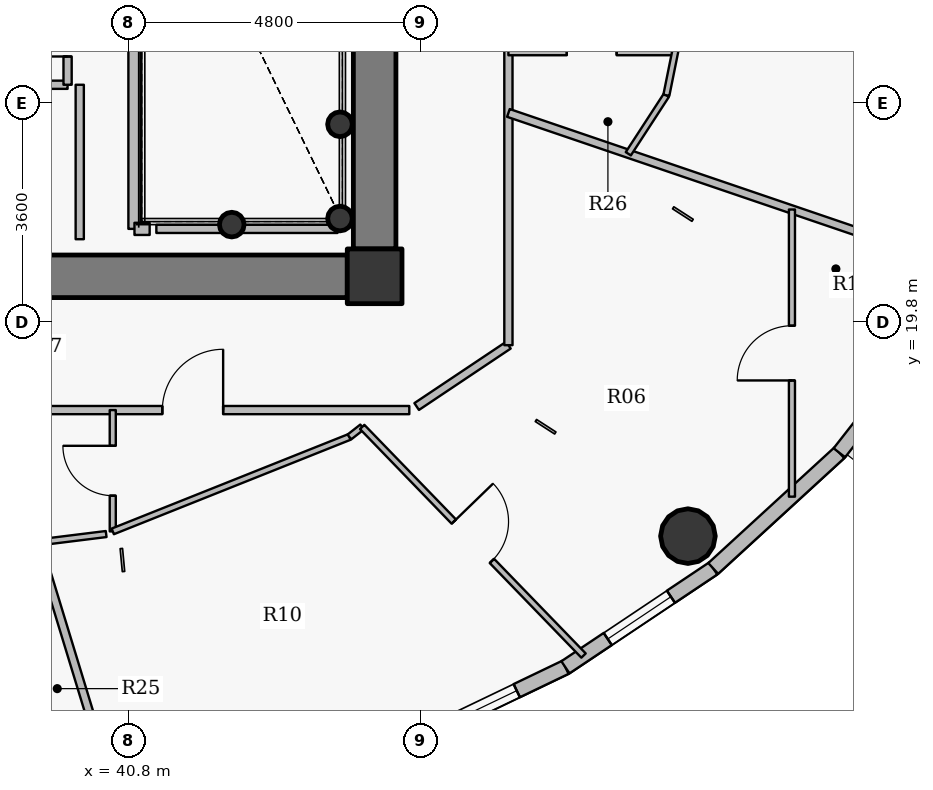
"""IFC4 building model, lengths in metres.
Left out: names, types, materials, properties, quantities, classifications, styles, units other than length and angle.
Written with IfcOpenShell. Run it as: python <this file> out.ifc"""

import sys

from ifc_helpers import new_model, si_unit, direction, frame, frame_2d, origin, origin_2d, place, context, subcontext, project, spatial, rectangle, hollow_circle, extrude, source, transform, mapped, element, fill, save


model = new_model("IFC4")
c1 = context("Model", 3, precision=1e-05, world=origin(), true_north=direction((0.0, 1.0)))
c2 = subcontext(c1, "Body", "Model", "MODEL_VIEW")
j1 = project(units=[si_unit("LENGTHUNIT", "METRE"), si_unit("PLANEANGLEUNIT", "RADIAN")], contexts=[c1])
p1 = place(None, origin())
s1 = spatial("IfcSite", under=j1, at=p1, CompositionType="ELEMENT")
p2 = place(p1, origin())
s2 = spatial("IfcBuilding", under=s1, at=p2, CompositionType="ELEMENT")
p3 = place(p2, frame((0.0, 0.0, 327.8)))
s3 = spatial("IfcBuildingStorey", under=s2, at=p3, CompositionType="ELEMENT", Elevation=327.8)
p4 = place(p3, frame((44.85, 20.55, 0.0), z_axis=(0.0, 0.0, 1.0), x_axis=(1.0, 0.0, 0.0)))
e1 = element("IfcColumn", 1, at=p4, inside=s3, PredefinedType="COLUMN", context=c2, shape_type="SweptSolid", body=[
    extrude(rectangle(XDim=0.9, YDim=0.9, at=origin_2d()), origin(), (0.0, 0.0, 1.0), 3.8),
])
for number, where, z_axis, x_axis in (
    (2, (44.28, 21.5, 0.0), (0.0, 0.0, 1.0), (1.0, 0.0, 0.0)),
    (3, (44.28, 23.05, 0.0), (0.0, 0.0, 1.0), (1.0, 0.0, 0.0)),
    (4, (42.5, 21.4, 0.0), (0.0, 0.0, 1.0), (1.0, 0.0, 0.0)),
):
    element("IfcColumn", number, at=place(p3, frame(where, z_axis=z_axis, x_axis=x_axis)), inside=s3, PredefinedType="COLUMN", context=c2, shape_type="SweptSolid", body=[
        extrude(hollow_circle(Radius=0.203, WallThickness=0.016, at=origin_2d()), origin(), (0.0, 0.0, 1.0), 3.8),
    ])
p5 = place(p3, frame((44.85, 33.0, 0.0), z_axis=(0.0, 0.0, 1.0), x_axis=(0.0, -1.0, 0.0)))
e5 = element("IfcWall", 5, at=p5, inside=s3, PredefinedType="SHEAR", context=c2, shape_type="SweptSolid", body=[
    extrude(rectangle(XDim=12.0, YDim=0.7, at=frame_2d((6.0, 0.0))), origin(), (0.0, 0.0, 1.0), 3.1),
])
p6 = place(p3, frame((44.4, 20.55, 0.0), z_axis=(0.0, 0.0, 1.0), x_axis=(-1.0, 0.0, 0.0)))
e6 = element("IfcWall", 6, at=p6, inside=s3, PredefinedType="SHEAR", context=c2, shape_type="SweptSolid", body=[
    extrude(rectangle(XDim=16.8, YDim=0.7, at=frame_2d((8.4, 0.0))), origin(), (0.0, 0.0, 1.0), 3.1),
])
p7 = place(p6, frame((13.0, 0.0, 0.0)))
e7 = element("IfcOpeningElement", 7, at=p7, cuts=e6, PredefinedType="OPENING", context=c2, shape_type="SweptSolid", body=[
    extrude(rectangle(XDim=1.15, YDim=2.15, at=origin_2d()), frame((0.575, 0.36, 1.075), z_axis=(0.0, -1.0, 0.0), x_axis=(1.0, 0.0, 0.0)), (0.0, 0.0, 1.0), 0.72),
])
p8 = place(p6, frame((9.15, 0.0, 0.0)))
e8 = element("IfcOpeningElement", 8, at=p8, cuts=e6, PredefinedType="OPENING", context=c2, shape_type="SweptSolid", body=[
    extrude(rectangle(XDim=1.15, YDim=2.15, at=origin_2d()), frame((0.575, 0.36, 1.075), z_axis=(0.0, -1.0, 0.0), x_axis=(1.0, 0.0, 0.0)), (0.0, 0.0, 1.0), 0.72),
])
p9 = place(p3, frame((50.002, 16.277, 0.0), z_axis=(0.0, 0.0, 1.0), x_axis=(1.0, 0.0, 0.0)))
e9 = element("IfcColumn", 9, at=p9, inside=s3, PredefinedType="COLUMN", context=c2, shape_type="SweptSolid", body=[
    extrude(hollow_circle(Radius=0.45, WallThickness=0.028, at=origin_2d()), origin(), (0.0, 0.0, 1.0), 3.8),
])
p10 = place(p3, frame((47.988, 14.12, 0.0), z_axis=(0.0, 0.0, 1.0), x_axis=(-0.901557057889, -0.432660226241, 0.0)))
e10 = element("IfcWall", 10, at=p10, inside=s3, PredefinedType="SOLIDWALL", context=c2, shape_type="SweptSolid", body=[
    extrude(rectangle(XDim=3.025, YDim=0.24, at=frame_2d((1.513, 0.0))), origin(), (0.0, 0.0, 1.0), 3.55),
])
p11 = place(p10, frame((0.888, 0.0, 0.9)))
e11 = element("IfcOpeningElement", 11, at=p11, cuts=e10, PredefinedType="OPENING", context=c2, shape_type="SweptSolid", body=[
    extrude(rectangle(XDim=1.25, YDim=1.65, at=origin_2d()), frame((0.625, 0.13, 0.825), z_axis=(0.0, -1.0, 0.0), x_axis=(1.0, 0.0, 0.0)), (0.0, 0.0, 1.0), 0.26),
])
p12 = place(p3, frame((50.419, 15.746, 0.0), z_axis=(0.0, 0.0, 1.0), x_axis=(-0.831201688654, -0.555970999944, 0.0)))
e12 = element("IfcWall", 12, at=p12, inside=s3, PredefinedType="SOLIDWALL", context=c2, shape_type="SweptSolid", body=[
    extrude(rectangle(XDim=2.925, YDim=0.24, at=frame_2d((1.462, 0.0))), origin(), (0.0, 0.0, 1.0), 3.55),
])
p13 = place(p12, frame((0.837, 0.0, 0.9)))
e13 = element("IfcOpeningElement", 13, at=p13, cuts=e12, PredefinedType="OPENING", context=c2, shape_type="SweptSolid", body=[
    extrude(rectangle(XDim=1.25, YDim=1.65, at=origin_2d()), frame((0.625, 0.13, 0.825), z_axis=(0.0, -1.0, 0.0), x_axis=(1.0, 0.0, 0.0)), (0.0, 0.0, 1.0), 0.26),
])
p14 = place(p3, frame((52.493, 17.648, 0.0), z_axis=(0.0, 0.0, 1.0), x_axis=(-0.737020907932, -0.675869944051, 0.0)))
e14 = element("IfcWall", 14, at=p14, inside=s3, PredefinedType="SOLIDWALL", context=c2, shape_type="SweptSolid", body=[
    extrude(rectangle(XDim=2.815, YDim=0.24, at=frame_2d((1.407, 0.0))), origin(), (0.0, 0.0, 1.0), 3.55),
])
p15 = place(p3, frame((54.161, 19.779, 0.0), z_axis=(0.0, 0.0, 1.0), x_axis=(-0.616286367698, -0.78752213492, 0.0)))
e15 = element("IfcWall", 15, at=p15, inside=s3, PredefinedType="SOLIDWALL", context=c2, shape_type="SweptSolid", body=[
    extrude(rectangle(XDim=2.706, YDim=0.24, at=frame_2d((1.353, 0.0))), origin(), (0.0, 0.0, 1.0), 3.55),
])
p16 = place(p3, frame((26.58, 18.35, 0.0), z_axis=(0.0, 0.0, 1.0), x_axis=(1.0, 0.0, 0.0)))
e16 = element("IfcWall", 16, at=p16, inside=s3, PredefinedType="PARTITIONING", context=c2, shape_type="SweptSolid", body=[
    extrude(rectangle(XDim=18.84, YDim=0.135, at=frame_2d((9.42, 0.0))), origin(), (0.0, 0.0, 1.0), 3.085),
])
p17 = place(p16, frame((0.94, 0.0, 0.0)))
e17 = element("IfcOpeningElement", 17, at=p17, cuts=e16, PredefinedType="OPENING", context=c2, shape_type="SweptSolid", body=[
    extrude(rectangle(XDim=1.0, YDim=2.15, at=origin_2d()), frame((0.5, 0.078, 1.075), z_axis=(0.0, -1.0, 0.0), x_axis=(1.0, 0.0, 0.0)), (0.0, 0.0, 1.0), 0.155),
])
p18 = place(p16, frame((6.621, 0.0, 0.0)))
e18 = element("IfcOpeningElement", 18, at=p18, cuts=e16, PredefinedType="OPENING", context=c2, shape_type="SweptSolid", body=[
    extrude(rectangle(XDim=1.0, YDim=2.15, at=origin_2d()), frame((0.5, 0.078, 1.075), z_axis=(0.0, -1.0, 0.0), x_axis=(1.0, 0.0, 0.0)), (0.0, 0.0, 1.0), 0.155),
])
p19 = place(p16, frame((14.778, 0.0, 0.0)))
e19 = element("IfcOpeningElement", 19, at=p19, cuts=e16, PredefinedType="OPENING", context=c2, shape_type="SweptSolid", body=[
    extrude(rectangle(XDim=1.0, YDim=2.15, at=origin_2d()), frame((0.5, 0.078, 1.075), z_axis=(0.0, -1.0, 0.0), x_axis=(1.0, 0.0, 0.0)), (0.0, 0.0, 1.0), 0.155),
])
p20 = place(p3, frame((35.45, 23.7, 0.0), z_axis=(0.0, 0.0, 1.0), x_axis=(1.0, 0.0, 0.0)))
e20 = element("IfcWall", 20, at=p20, inside=s3, PredefinedType="PARTITIONING", context=c2, shape_type="SweptSolid", body=[
    extrude(rectangle(XDim=4.35, YDim=0.135, at=frame_2d((2.175, 0.0))), origin(), (0.0, 0.0, 1.0), 3.135),
])
p21 = place(p20, frame((1.625, 0.0, 0.0)))
e21 = element("IfcOpeningElement", 21, at=p21, cuts=e20, PredefinedType="OPENING", context=c2, shape_type="SweptSolid", body=[
    extrude(rectangle(XDim=1.1, YDim=2.15, at=origin_2d()), frame((0.55, 0.078, 1.075), z_axis=(0.0, -1.0, 0.0), x_axis=(1.0, 0.0, 0.0)), (0.0, 0.0, 1.0), 0.155),
])
p22 = place(p3, frame((39.304, 16.171, 0.0), z_axis=(0.0, 0.0, 1.0), x_axis=(0.992405921313, 0.123006045959, 0.0)))
e22 = element("IfcWall", 22, at=p22, inside=s3, PredefinedType="PARTITIONING", context=c2, shape_type="SweptSolid", body=[
    extrude(rectangle(XDim=1.139, YDim=0.1, at=frame_2d((0.57, 0.0))), origin(), (0.0, 0.0, 1.0), 3.085),
])
p23 = place(p3, frame((39.304, 16.171, 0.0), z_axis=(0.0, 0.0, 1.0), x_axis=(0.291820739467, -0.956473029425, 0.0)))
e23 = element("IfcWall", 23, at=p23, inside=s3, PredefinedType="PARTITIONING", context=c2, shape_type="SweptSolid", body=[
    extrude(rectangle(XDim=4.834, YDim=0.135, at=frame_2d((2.417, 0.0))), origin(), (0.0, 0.0, 1.0), 3.035),
])
p24 = place(p3, frame((39.8, 23.7, 0.0), z_axis=(0.0, 0.0, 1.0), x_axis=(0.0, 1.0, 0.0)))
e24 = element("IfcWall", 24, at=p24, inside=s3, PredefinedType="PARTITIONING", context=c2, shape_type="SweptSolid", body=[
    extrude(rectangle(XDim=1.75, YDim=0.135, at=frame_2d((0.875, 0.0))), origin(), (0.0, 0.0, 1.0), 3.55),
])
p25 = place(p24, frame((0.465, 0.0, 0.0)))
e25 = element("IfcOpeningElement", 25, at=p25, cuts=e24, PredefinedType="OPENING", context=c2, shape_type="SweptSolid", body=[
    extrude(rectangle(XDim=0.82, YDim=2.1, at=origin_2d()), frame((0.41, 0.078, 1.05), z_axis=(0.0, -1.0, 0.0), x_axis=(1.0, 0.0, 0.0)), (0.0, 0.0, 1.0), 0.155),
])
p26 = place(p3, frame((40.543, 16.355, 0.0), z_axis=(0.0, 0.0, 1.0), x_axis=(0.0, 1.0, 0.0)))
e26 = element("IfcWall", 26, at=p26, inside=s3, PredefinedType="PARTITIONING", context=c2, shape_type="SweptSolid", body=[
    extrude(rectangle(XDim=1.995, YDim=0.1, at=frame_2d((0.998, 0.0))), origin(), (0.0, 0.0, 1.0), 3.085),
])
p27 = place(p26, frame((0.588, 0.0, 0.0)))
e27 = element("IfcOpeningElement", 27, at=p27, cuts=e26, PredefinedType="OPENING", context=c2, shape_type="SweptSolid", body=[
    extrude(rectangle(XDim=0.82, YDim=2.1, at=origin_2d()), frame((0.41, 0.06, 1.05), z_axis=(0.0, -1.0, 0.0), x_axis=(1.0, 0.0, 0.0)), (0.0, 0.0, 1.0), 0.12),
])
p28 = place(p3, frame((40.543, 16.355, 0.0), z_axis=(0.0, 0.0, 1.0), x_axis=(0.928785770399, 0.370617043191, 0.0)))
e28 = element("IfcWall", 28, at=p28, inside=s3, PredefinedType="PARTITIONING", context=c2, shape_type="SweptSolid", body=[
    extrude(rectangle(XDim=4.19, YDim=0.1, at=frame_2d((2.095, 0.0))), origin(), (0.0, 0.0, 1.0), 3.085),
])
p29 = place(p3, frame((40.9, 21.33, 0.0), z_axis=(0.0, 0.0, 1.0), x_axis=(0.0, 1.0, 0.0)))
e29 = element("IfcWall", 29, at=p29, inside=s3, PredefinedType="PARTITIONING", context=c2, shape_type="SweptSolid", body=[
    extrude(rectangle(XDim=5.91, YDim=0.2, at=frame_2d((2.955, 0.0))), origin(), (0.0, 0.0, 1.0), 3.085),
])
p30 = place(p3, frame((40.9, 21.33, 0.0), z_axis=(0.0, 0.0, 1.0), x_axis=(1.0, 0.0, 0.0)))
e30 = element("IfcWall", 30, at=p30, inside=s3, PredefinedType="PARTITIONING", context=c2, shape_type="SweptSolid", body=[
    extrude(rectangle(XDim=0.25, YDim=0.2, at=frame_2d((0.125, 0.0))), origin(), (0.0, 0.0, 1.0), 3.085),
])
p31 = place(p3, frame((44.435, 17.908, 0.0), z_axis=(0.0, 0.0, 1.0), x_axis=(0.787427799495, 0.616406895307, 0.0)))
e31 = element("IfcWall", 31, at=p31, inside=s3, PredefinedType="PARTITIONING", context=c2, shape_type="SweptSolid", body=[
    extrude(rectangle(XDim=0.267, YDim=0.1, at=frame_2d((0.133, 0.0))), origin(), (0.0, 0.0, 1.0), 3.55),
])
p32 = place(p3, frame((44.645, 18.073, 0.0), z_axis=(0.0, 0.0, 1.0), x_axis=(0.695656073062, -0.718374991221, 0.0)))
e32 = element("IfcWall", 32, at=p32, inside=s3, PredefinedType="PARTITIONING", context=c2, shape_type="SweptSolid", body=[
    extrude(rectangle(XDim=5.233, YDim=0.1, at=frame_2d((2.617, 0.0))), origin(), (0.0, 0.0, 1.0), 3.035),
])
p33 = place(p32, frame((2.167, 0.0, 0.0)))
e33 = element("IfcOpeningElement", 33, at=p33, cuts=e32, PredefinedType="OPENING", context=c2, shape_type="SweptSolid", body=[
    extrude(rectangle(XDim=0.9, YDim=2.1, at=origin_2d()), frame((0.45, 0.06, 1.05), z_axis=(0.0, -1.0, 0.0), x_axis=(1.0, 0.0, 0.0)), (0.0, 0.0, 1.0), 0.12),
])
p34 = place(p3, frame((45.541, 18.408, 0.0), z_axis=(0.0, 0.0, 1.0), x_axis=(0.831180227396, 0.556003084151, 0.0)))
e34 = element("IfcWall", 34, at=p34, inside=s3, PredefinedType="PARTITIONING", context=c2, shape_type="SweptSolid", body=[
    extrude(rectangle(XDim=1.815, YDim=0.135, at=frame_2d((0.908, 0.0))), origin(), (0.0, 0.0, 1.0), 3.085),
])
p35 = place(p3, frame((47.05, 19.417, 0.0), z_axis=(0.0, 0.0, 1.0), x_axis=(0.0, 1.0, 0.0)))
e35 = element("IfcWall", 35, at=p35, inside=s3, PredefinedType="PARTITIONING", context=c2, shape_type="SweptSolid", body=[
    extrude(rectangle(XDim=15.165, YDim=0.135, at=frame_2d((7.583, 0.0))), origin(), (0.0, 0.0, 1.0), 3.085),
])
p36 = place(p35, frame((9.957, 0.0, 0.0)))
e36 = element("IfcOpeningElement", 36, at=p36, cuts=e35, PredefinedType="OPENING", context=c2, shape_type="SweptSolid", body=[
    extrude(rectangle(XDim=1.0, YDim=2.15, at=origin_2d()), frame((0.5, 0.078, 1.075), z_axis=(0.0, -1.0, 0.0), x_axis=(1.0, 0.0, 0.0)), (0.0, 0.0, 1.0), 0.155),
])
p37 = place(p3, frame((47.05, 23.237, 0.0), z_axis=(0.0, 0.0, 1.0), x_axis=(0.946614475353, -0.32236785673, 0.0)))
e37 = element("IfcWall", 37, at=p37, inside=s3, PredefinedType="PARTITIONING", context=c2, shape_type="SweptSolid", body=[
    extrude(rectangle(XDim=8.007, YDim=0.135, at=frame_2d((4.004, 0.0))), origin(), (0.0, 0.0, 1.0), 3.035),
])
p38 = place(p3, frame((47.05, 24.235, 0.0), z_axis=(0.0, 0.0, 1.0), x_axis=(1.0, 0.0, 0.0)))
e38 = element("IfcWall", 38, at=p38, inside=s3, PredefinedType="PARTITIONING", context=c2, shape_type="SweptSolid", body=[
    extrude(rectangle(XDim=2.741, YDim=0.1, at=frame_2d((1.37, 0.0))), origin(), (0.0, 0.0, 1.0), 3.55),
])
p39 = place(p38, frame((0.96, 0.0, 0.0)))
e39 = element("IfcOpeningElement", 39, at=p39, cuts=e38, PredefinedType="OPENING", context=c2, shape_type="SweptSolid", body=[
    extrude(rectangle(XDim=0.82, YDim=2.1, at=origin_2d()), frame((0.41, 0.06, 1.05), z_axis=(0.0, -1.0, 0.0), x_axis=(1.0, 0.0, 0.0)), (0.0, 0.0, 1.0), 0.12),
])
p40 = place(p3, frame((49.022, 22.565, 0.0), z_axis=(0.0, 0.0, 1.0), x_axis=(0.545436909984, 0.838151881957, 0.0)))
e40 = element("IfcWall", 40, at=p40, inside=s3, PredefinedType="PARTITIONING", context=c2, shape_type="SweptSolid", body=[
    extrude(rectangle(XDim=1.148, YDim=0.1, at=frame_2d((0.574, 0.0))), origin(), (0.0, 0.0, 1.0), 3.55),
])
p41 = place(p3, frame((49.648, 23.527, 0.0), z_axis=(0.0, 0.0, 1.0), x_axis=(0.198249177906, 0.980151653296, 0.0)))
e41 = element("IfcWall", 41, at=p41, inside=s3, PredefinedType="PARTITIONING", context=c2, shape_type="SweptSolid", body=[
    extrude(rectangle(XDim=3.543, YDim=0.1, at=frame_2d((1.771, 0.0))), origin(), (0.0, 0.0, 1.0), 3.085),
])
p42 = place(p3, frame((51.713, 16.926, 0.0), z_axis=(0.0, 0.0, 1.0), x_axis=(0.0, 1.0, 0.0)))
e42 = element("IfcWall", 42, at=p42, inside=s3, PredefinedType="PARTITIONING", context=c2, shape_type="SweptSolid", body=[
    extrude(rectangle(XDim=4.722, YDim=0.1, at=frame_2d((2.361, 0.0))), origin(), (0.0, 0.0, 1.0), 3.035),
])
p43 = place(p42, frame((1.911, 0.0, 0.0)))
e43 = element("IfcOpeningElement", 43, at=p43, cuts=e42, PredefinedType="OPENING", context=c2, shape_type="SweptSolid", body=[
    extrude(rectangle(XDim=0.9, YDim=2.1, at=origin_2d()), frame((0.45, 0.06, 1.05), z_axis=(0.0, -1.0, 0.0), x_axis=(1.0, 0.0, 0.0)), (0.0, 0.0, 1.0), 0.12),
])
p44 = place(p3, frame((44.24, 21.33, 0.0), z_axis=(0.0, 0.0, 1.0), x_axis=(-1.0, 0.0, 0.0)))
e44 = element("IfcWall", 44, at=p44, inside=s3, PredefinedType="PARTITIONING", context=c2, shape_type="SweptSolid", body=[
    extrude(rectangle(XDim=2.98, YDim=0.135, at=frame_2d((1.49, 0.0))), origin(), (0.0, 0.0, 1.0), 3.085),
])
p45 = place(p3, frame((40.0, 23.7, 0.0), z_axis=(0.0, 0.0, 1.0), x_axis=(0.0, -1.0, 0.0)))
e45 = element("IfcWall", 45, at=p45, inside=s3, PredefinedType="PARTITIONING", context=c2, shape_type="SweptSolid", body=[
    extrude(rectangle(XDim=2.54, YDim=0.135, at=frame_2d((1.27, 0.0))), origin(), (0.0, 0.0, 1.0), 3.085),
])
p46 = place(p3, frame((44.41, 20.2, 0.0), z_axis=(0.0, 0.0, 1.0), x_axis=(1.0, 0.0, 0.0)))
e46 = element("IfcWall", 46, at=p46, inside=s3, PredefinedType="PARTITIONING", context=c2, shape_type="SweptSolid", body=[
    extrude(rectangle(XDim=0.79, YDim=0.135, at=frame_2d((0.395, 0.0))), origin(), (0.0, 0.0, 1.0), 3.085),
])
p47 = place(p3, frame((45.2, 20.508, 0.0), z_axis=(0.0, 0.0, 1.0), x_axis=(0.0, 1.0, 0.0)))
e47 = element("IfcWall", 47, at=p47, inside=s3, PredefinedType="PARTITIONING", context=c2, shape_type="SweptSolid", body=[
    extrude(rectangle(XDim=0.482, YDim=0.135, at=frame_2d((0.241, 0.0))), origin(), (0.0, 0.0, 1.0), 3.55),
])
m1 = source(origin(), c2, "Body", "SweptSolid", [
    extrude(rectangle(XDim=1.25, YDim=1.65, at=origin_2d()), frame((0.625, 0.03, 0.825), z_axis=(0.0, -1.0, 0.0), x_axis=(1.0, 0.0, 0.0)), (0.0, 0.0, 1.0), 0.06),
])
p48 = place(p11, origin())
e48 = element("IfcWindow", 48, at=p48, inside=s3, PartitioningType="SINGLE_PANEL", PredefinedType="WINDOW", context=c2, shape_type="MappedRepresentation", body=[
    mapped(m1, transform((0.0, 0.0, 0.0), x_axis=(1.0, 0.0, 0.0), y_axis=(0.0, 1.0, 0.0), z_axis=(0.0, 0.0, 1.0), scale=1.0)),
])
fill(e11, e48)
p49 = place(p13, origin())
e49 = element("IfcWindow", 49, at=p49, inside=s3, PartitioningType="SINGLE_PANEL", PredefinedType="WINDOW", context=c2, shape_type="MappedRepresentation", body=[
    mapped(m1, transform((0.0, 0.0, 0.0), x_axis=(1.0, 0.0, 0.0), y_axis=(0.0, 1.0, 0.0), z_axis=(0.0, 0.0, 1.0), scale=1.0)),
])
fill(e13, e49)
m2 = source(origin(), c2, "Body", "SweptSolid", [
    extrude(rectangle(XDim=1.0, YDim=2.15, at=origin_2d()), frame((0.5, 0.025, 1.075), z_axis=(0.0, -1.0, 0.0), x_axis=(1.0, 0.0, 0.0)), (0.0, 0.0, 1.0), 0.05),
])
p50 = place(p19, origin())
e50 = element("IfcDoor", 50, at=p50, inside=s3, OperationType="SINGLE_SWING_RIGHT", PredefinedType="DOOR", context=c2, shape_type="MappedRepresentation", body=[
    mapped(m2, transform((0.0, 0.0, 0.0), x_axis=(1.0, 0.0, 0.0), y_axis=(0.0, 1.0, 0.0), z_axis=(0.0, 0.0, 1.0), scale=1.0)),
])
fill(e19, e50)
m3 = source(origin(), c2, "Body", "SweptSolid", [
    extrude(rectangle(XDim=0.9, YDim=2.1, at=origin_2d()), frame((0.45, 0.025, 1.05), z_axis=(0.0, -1.0, 0.0), x_axis=(1.0, 0.0, 0.0)), (0.0, 0.0, 1.0), 0.05),
])
p51 = place(p33, origin())
e51 = element("IfcDoor", 51, at=p51, inside=s3, OperationType="SINGLE_SWING_LEFT", PredefinedType="DOOR", context=c2, shape_type="MappedRepresentation", body=[
    mapped(m3, transform((0.0, 0.0, 0.0), x_axis=(1.0, 0.0, 0.0), y_axis=(0.0, 1.0, 0.0), z_axis=(0.0, 0.0, 1.0), scale=1.0)),
])
fill(e33, e51)
m4 = source(origin(), c2, "Body", "SweptSolid", [
    extrude(rectangle(XDim=0.82, YDim=2.1, at=origin_2d()), frame((0.41, 0.025, 1.05), z_axis=(0.0, -1.0, 0.0), x_axis=(1.0, 0.0, 0.0)), (0.0, 0.0, 1.0), 0.05),
])
p52 = place(p27, origin())
e52 = element("IfcDoor", 52, at=p52, inside=s3, OperationType="SINGLE_SWING_RIGHT", PredefinedType="DOOR", context=c2, shape_type="MappedRepresentation", body=[
    mapped(m4, transform((0.0, 0.0, 0.0), x_axis=(1.0, 0.0, 0.0), y_axis=(0.0, 1.0, 0.0), z_axis=(0.0, 0.0, 1.0), scale=1.0)),
])
fill(e27, e52)
p53 = place(p43, origin())
e53 = element("IfcDoor", 53, at=p53, inside=s3, OperationType="SINGLE_SWING_LEFT", PredefinedType="DOOR", context=c2, shape_type="MappedRepresentation", body=[
    mapped(m3, transform((0.0, 0.0, 0.0), x_axis=(1.0, 0.0, 0.0), y_axis=(0.0, 1.0, 0.0), z_axis=(0.0, 0.0, 1.0), scale=1.0)),
])
fill(e43, e53)
p54 = place(p39, origin())
e54 = element("IfcDoor", 54, at=p54, inside=s3, OperationType="SINGLE_SWING_RIGHT", PredefinedType="DOOR", context=c2, shape_type="MappedRepresentation", body=[
    mapped(m4, transform((0.0, 0.0, 0.0), x_axis=(1.0, 0.0, 0.0), y_axis=(0.0, 1.0, 0.0), z_axis=(0.0, 0.0, 1.0), scale=1.0)),
])
fill(e39, e54)
p55 = place(p25, origin())
e55 = element("IfcDoor", 55, at=p55, inside=s3, OperationType="SINGLE_SWING_LEFT", PredefinedType="DOOR", context=c2, shape_type="MappedRepresentation", body=[
    mapped(m4, transform((0.0, 0.0, 0.0), x_axis=(1.0, 0.0, 0.0), y_axis=(0.0, 1.0, 0.0), z_axis=(0.0, 0.0, 1.0), scale=1.0)),
])
fill(e25, e55)
save(model, sys.argv[1])
